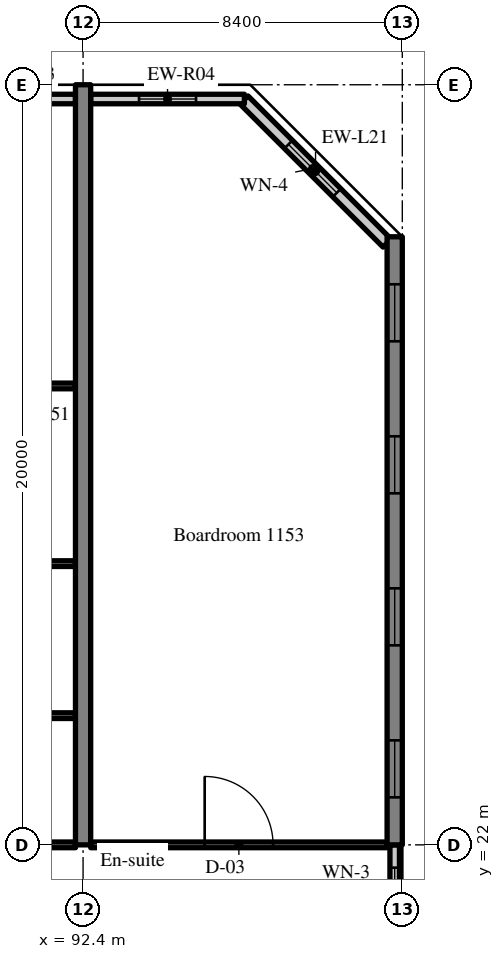
"""IFC4 building model, lengths in metres.
Left out: names, types, materials, properties, quantities, classifications, styles, units other than length and angle.
Written with IfcOpenShell. Run it as: python <this file> out.ifc"""

import sys

from ifc_helpers import new_model, si_unit, direction, frame, frame_2d, origin, place, context, subcontext, project, spatial, rectangle, extrude, source, transform, mapped, element, fill, save


model = new_model("IFC4")
c1 = context("Model", 3, precision=1e-05, world=origin(), true_north=direction((0.0, 1.0)))
c2 = subcontext(c1, "Body", "Model", "MODEL_VIEW")
j1 = project(units=[si_unit("LENGTHUNIT", "METRE"), si_unit("PLANEANGLEUNIT", "RADIAN")], contexts=[c1])
p1 = place(None, origin())
s1 = spatial("IfcSite", under=j1, at=p1, CompositionType="ELEMENT")
p2 = place(p1, origin())
s2 = spatial("IfcBuilding", under=s1, at=p2, CompositionType="ELEMENT")
p3 = place(p2, frame((0.0, 0.0, 50.6)))
s3 = spatial("IfcBuildingStorey", under=s2, at=p3, CompositionType="ELEMENT", Elevation=50.6)
m1 = source(origin(), c2, "Body", "SweptSolid", [
    extrude(rectangle(XDim=20.0, YDim=0.4, at=frame_2d((10.0, 0.0))), origin(), (0.0, 0.0, 1.0), 3.52),
])
p4 = place(p3, frame((92.4, 22.0, 0.0), z_axis=(0.0, 0.0, 1.0), x_axis=(0.0, 1.0, 0.0)))
e1 = element("IfcWall", 1, at=p4, inside=s3, PredefinedType="SHEAR", context=c2, shape_type="MappedRepresentation", body=[
    mapped(m1, transform((0.0, 0.0, 0.0), scale=1.0)),
])
m2 = source(origin(), c2, "Body", "SweptSolid", [
    extrude(rectangle(XDim=16.0, YDim=0.4, at=frame_2d((8.0, 0.0))), origin(), (0.0, 0.0, 1.0), 3.52),
])
p5 = place(p3, frame((100.6, 22.0, 0.0), z_axis=(0.0, 0.0, 1.0), x_axis=(0.0, 1.0, 0.0)))
e2 = element("IfcWall", 2, at=p5, inside=s3, PredefinedType="SHEAR", context=c2, shape_type="MappedRepresentation", body=[
    mapped(m2, transform((0.0, 0.0, 0.0), scale=1.0)),
])
m3 = source(origin(), c2, "Body", "SweptSolid", [
    extrude(rectangle(XDim=1.5, YDim=1.5, at=frame_2d((0.75, 0.75))), frame((0.0, 0.21, 0.0), z_axis=(0.0, -1.0, 0.0), x_axis=(1.0, 0.0, 0.0)), (0.0, 0.0, 1.0), 0.42),
])
p6 = place(p5, frame((1.25, 0.0, 0.9)))
e3 = element("IfcOpeningElement", 3, at=p6, cuts=e2, PredefinedType="OPENING", context=c2, shape_type="MappedRepresentation", body=[
    mapped(m3, transform((0.0, 0.0, 0.0), scale=1.0)),
])
p7 = place(p5, frame((5.25, 0.0, 0.9)))
e4 = element("IfcOpeningElement", 4, at=p7, cuts=e2, PredefinedType="OPENING", context=c2, shape_type="MappedRepresentation", body=[
    mapped(m3, transform((0.0, 0.0, 0.0), scale=1.0)),
])
p8 = place(p5, frame((9.25, 0.0, 0.9)))
e5 = element("IfcOpeningElement", 5, at=p8, cuts=e2, PredefinedType="OPENING", context=c2, shape_type="MappedRepresentation", body=[
    mapped(m3, transform((0.0, 0.0, 0.0), scale=1.0)),
])
p9 = place(p5, frame((13.25, 0.0, 0.9)))
e6 = element("IfcOpeningElement", 6, at=p9, cuts=e2, PredefinedType="OPENING", context=c2, shape_type="MappedRepresentation", body=[
    mapped(m3, transform((0.0, 0.0, 0.0), scale=1.0)),
])
m4 = source(origin(), c2, "Body", "SweptSolid", [
    extrude(rectangle(XDim=5.326, YDim=0.3, at=frame_2d((2.663, 0.0))), origin(), (0.0, 0.0, 1.0), 3.52),
])
p10 = place(p3, frame((100.4, 37.834, 0.0), z_axis=(0.0, 0.0, 1.0), x_axis=(-0.707083859269, 0.707129702361, 0.0)))
e7 = element("IfcWall", 7, at=p10, inside=s3, PredefinedType="SOLIDWALL", context=c2, shape_type="MappedRepresentation", body=[
    mapped(m4, transform((0.0, 0.0, 0.0), scale=1.0)),
])
m5 = source(origin(), c2, "Body", "SweptSolid", [
    extrude(rectangle(XDim=1.8, YDim=1.5, at=frame_2d((0.9, 0.75))), frame((0.0, 0.16, 0.0), z_axis=(0.0, -1.0, 0.0), x_axis=(1.0, 0.0, 0.0)), (0.0, 0.0, 1.0), 0.32),
])
p11 = place(p10, frame((1.871, 0.0, 0.9)))
e8 = element("IfcOpeningElement", 8, at=p11, cuts=e7, PredefinedType="OPENING", context=c2, shape_type="MappedRepresentation", body=[
    mapped(m5, transform((0.0, 0.0, 0.0), scale=1.0)),
])
m6 = source(origin(), c2, "Body", "SweptSolid", [
    extrude(rectangle(XDim=3.6, YDim=0.25, at=frame_2d((1.8, 0.0))), origin(), (0.0, 0.0, 1.0), 2.82),
])
p12 = place(p3, frame((92.2, 41.625, 0.0), z_axis=(0.0, 0.0, 1.0), x_axis=(-1.0, 0.0, 0.0)))
e9 = element("IfcWall", 9, at=p12, inside=s3, PredefinedType="SOLIDWALL", context=c2, shape_type="MappedRepresentation", body=[
    mapped(m6, transform((0.0, 0.0, 0.0), scale=1.0)),
])
m7 = source(origin(), c2, "Body", "SweptSolid", [
    extrude(rectangle(XDim=1.5, YDim=1.5, at=frame_2d((0.75, 0.75))), frame((0.0, 0.135, 0.0), z_axis=(0.0, -1.0, 0.0), x_axis=(1.0, 0.0, 0.0)), (0.0, 0.0, 1.0), 0.27),
])
p13 = place(p12, frame((1.05, 0.0, 0.9)))
e10 = element("IfcOpeningElement", 10, at=p13, cuts=e9, PredefinedType="OPENING", context=c2, shape_type="MappedRepresentation", body=[
    mapped(m7, transform((0.0, 0.0, 0.0), scale=1.0)),
])
m8 = source(origin(), c2, "Body", "SweptSolid", [
    extrude(rectangle(XDim=4.045, YDim=0.25, at=frame_2d((2.022, 0.0))), origin(), (0.0, 0.0, 1.0), 2.82),
])
p14 = place(p3, frame((96.645, 41.625, 0.0), z_axis=(0.0, 0.0, 1.0), x_axis=(-1.0, 0.0, 0.0)))
e11 = element("IfcWall", 11, at=p14, inside=s3, PredefinedType="SOLIDWALL", context=c2, shape_type="MappedRepresentation", body=[
    mapped(m8, transform((0.0, 0.0, 0.0), scale=1.0)),
])
p15 = place(p14, frame((1.272, 0.0, 0.9)))
e12 = element("IfcOpeningElement", 12, at=p15, cuts=e11, PredefinedType="OPENING", context=c2, shape_type="MappedRepresentation", body=[
    mapped(m7, transform((0.0, 0.0, 0.0), scale=1.0)),
])
m9 = source(origin(), c2, "Body", "SweptSolid", [
    extrude(rectangle(XDim=2.4, YDim=0.25, at=frame_2d((1.2, 0.0))), origin(), (0.0, 0.0, 1.0), 2.62),
])
p16 = place(p3, frame((100.6, 19.6, 0.0), z_axis=(0.0, 0.0, 1.0), x_axis=(0.0, 1.0, 0.0)))
e13 = element("IfcWall", 13, at=p16, inside=s3, PredefinedType="SOLIDWALL", context=c2, shape_type="MappedRepresentation", body=[
    mapped(m9, transform((0.0, 0.0, 0.0), scale=1.0)),
])
m10 = source(origin(), c2, "Body", "SweptSolid", [
    extrude(rectangle(XDim=1.2, YDim=1.5, at=frame_2d((0.6, 0.75))), frame((0.0, 0.135, 0.0), z_axis=(0.0, -1.0, 0.0), x_axis=(1.0, 0.0, 0.0)), (0.0, 0.0, 1.0), 0.27),
])
p17 = place(p16, frame((0.6, 0.0, 0.9)))
e14 = element("IfcOpeningElement", 14, at=p17, cuts=e13, PredefinedType="OPENING", context=c2, shape_type="MappedRepresentation", body=[
    mapped(m10, transform((0.0, 0.0, 0.0), scale=1.0)),
])
m11 = source(origin(), c2, "Body", "SweptSolid", [
    extrude(rectangle(XDim=5.45, YDim=0.15, at=frame_2d((2.725, 0.0))), origin(), (0.0, 0.0, 1.0), 2.82),
])
p18 = place(p3, frame((86.75, 22.0, 0.0), z_axis=(0.0, 0.0, 1.0), x_axis=(1.0, 0.0, 0.0)))
e15 = element("IfcWall", 15, at=p18, inside=s3, PredefinedType="PARTITIONING", context=c2, shape_type="MappedRepresentation", body=[
    mapped(m11, transform((0.0, 0.0, 0.0), scale=1.0)),
])
m12 = source(origin(), c2, "Body", "SweptSolid", [
    extrude(rectangle(XDim=5.45, YDim=0.15, at=frame_2d((2.725, 0.0))), origin(), (0.0, 0.0, 1.0), 3.52),
])
for number, where, z_axis, x_axis in (
    (16, (86.75, 25.4, 0.0), (0.0, 0.0, 1.0), (1.0, 0.0, 0.0)),
    (17, (86.75, 29.4, 0.0), (0.0, 0.0, 1.0), (1.0, 0.0, 0.0)),
):
    element("IfcWall", number, at=place(p3, frame(where, z_axis=z_axis, x_axis=x_axis)), inside=s3, PredefinedType="PARTITIONING", context=c2, shape_type="MappedRepresentation", body=[
        mapped(m12, transform((0.0, 0.0, 0.0), scale=1.0)),
    ])
m13 = source(origin(), c2, "Body", "SweptSolid", [
    extrude(rectangle(XDim=8.0, YDim=0.15, at=frame_2d((4.0, 0.0))), origin(), (0.0, 0.0, 1.0), 3.52),
])
p19 = place(p3, frame((84.2, 34.075, 0.0), z_axis=(0.0, 0.0, 1.0), x_axis=(1.0, 0.0, 0.0)))
e18 = element("IfcWall", 18, at=p19, inside=s3, PredefinedType="PARTITIONING", context=c2, shape_type="MappedRepresentation", body=[
    mapped(m13, transform((0.0, 0.0, 0.0), scale=1.0)),
])
m14 = source(origin(), c2, "Body", "SweptSolid", [
    extrude(rectangle(XDim=1.0, YDim=2.1, at=frame_2d((0.5, 1.05))), frame((0.0, 0.085, 0.0), z_axis=(0.0, -1.0, 0.0), x_axis=(1.0, 0.0, 0.0)), (0.0, 0.0, 1.0), 0.17),
])
p20 = place(p19, frame((0.7, 0.0, 0.0)))
e19 = element("IfcOpeningElement", 19, at=p20, cuts=e18, PredefinedType="OPENING", context=c2, shape_type="MappedRepresentation", body=[
    mapped(m14, transform((0.0, 0.0, 0.0), scale=1.0)),
])
m15 = source(origin(), c2, "Body", "SweptSolid", [
    extrude(rectangle(XDim=7.8, YDim=0.15, at=frame_2d((3.9, 0.0))), origin(), (0.0, 0.0, 1.0), 2.82),
])
p21 = place(p3, frame((92.6, 22.0, 0.0), z_axis=(0.0, 0.0, 1.0), x_axis=(1.0, 0.0, 0.0)))
e20 = element("IfcWall", 20, at=p21, inside=s3, PredefinedType="PARTITIONING", context=c2, shape_type="MappedRepresentation", body=[
    mapped(m15, transform((0.0, 0.0, 0.0), scale=1.0)),
])
m16 = source(origin(), c2, "Body", "SweptSolid", [
    extrude(rectangle(XDim=1.8, YDim=2.1, at=frame_2d((0.9, 1.05))), frame((0.0, 0.085, 0.0), z_axis=(0.0, -1.0, 0.0), x_axis=(1.0, 0.0, 0.0)), (0.0, 0.0, 1.0), 0.17),
])
p22 = place(p21, frame((3.0, 0.0, 0.0)))
e21 = element("IfcOpeningElement", 21, at=p22, cuts=e20, PredefinedType="OPENING", context=c2, shape_type="MappedRepresentation", body=[
    mapped(m16, transform((0.0, 0.0, 0.0), scale=1.0)),
])
m17 = source(origin(), c2, "Body", "SweptSolid", [
    extrude(rectangle(XDim=1.8, YDim=1.5, at=frame_2d((0.9, 0.75))), frame((0.0, 0.03, 0.0), z_axis=(0.0, -1.0, 0.0), x_axis=(1.0, 0.0, 0.0)), (0.0, 0.0, 1.0), 0.06),
])
p23 = place(p11, origin())
e22 = element("IfcWindow", 22, at=p23, inside=s3, PartitioningType="SINGLE_PANEL", PredefinedType="WINDOW", context=c2, shape_type="MappedRepresentation", body=[
    mapped(m17, transform((0.0, 0.0, 0.0), scale=1.0)),
])
fill(e8, e22)
m18 = source(origin(), c2, "Body", "SweptSolid", [
    extrude(rectangle(XDim=1.5, YDim=1.5, at=frame_2d((0.75, 0.75))), frame((0.0, 0.03, 0.0), z_axis=(0.0, -1.0, 0.0), x_axis=(1.0, 0.0, 0.0)), (0.0, 0.0, 1.0), 0.06),
])
p24 = place(p15, origin())
e23 = element("IfcWindow", 23, at=p24, inside=s3, PartitioningType="SINGLE_PANEL", PredefinedType="WINDOW", context=c2, shape_type="MappedRepresentation", body=[
    mapped(m18, transform((0.0, 0.0, 0.0), scale=1.0)),
])
fill(e12, e23)
p25 = place(p6, origin())
e24 = element("IfcWindow", 24, at=p25, inside=s3, PartitioningType="SINGLE_PANEL", PredefinedType="WINDOW", context=c2, shape_type="MappedRepresentation", body=[
    mapped(m18, transform((0.0, 0.0, 0.0), scale=1.0)),
])
fill(e3, e24)
p26 = place(p7, origin())
e25 = element("IfcWindow", 25, at=p26, inside=s3, PartitioningType="SINGLE_PANEL", PredefinedType="WINDOW", context=c2, shape_type="MappedRepresentation", body=[
    mapped(m18, transform((0.0, 0.0, 0.0), scale=1.0)),
])
fill(e4, e25)
p27 = place(p8, origin())
e26 = element("IfcWindow", 26, at=p27, inside=s3, PartitioningType="SINGLE_PANEL", PredefinedType="WINDOW", context=c2, shape_type="MappedRepresentation", body=[
    mapped(m18, transform((0.0, 0.0, 0.0), scale=1.0)),
])
fill(e5, e26)
p28 = place(p9, origin())
e27 = element("IfcWindow", 27, at=p28, inside=s3, PartitioningType="SINGLE_PANEL", PredefinedType="WINDOW", context=c2, shape_type="MappedRepresentation", body=[
    mapped(m18, transform((0.0, 0.0, 0.0), scale=1.0)),
])
fill(e6, e27)
m19 = source(origin(), c2, "Body", "SweptSolid", [
    extrude(rectangle(XDim=1.2, YDim=1.5, at=frame_2d((0.6, 0.75))), frame((0.0, 0.03, 0.0), z_axis=(0.0, -1.0, 0.0), x_axis=(1.0, 0.0, 0.0)), (0.0, 0.0, 1.0), 0.06),
])
p29 = place(p17, origin())
e28 = element("IfcWindow", 28, at=p29, inside=s3, PartitioningType="SINGLE_PANEL", PredefinedType="WINDOW", context=c2, shape_type="MappedRepresentation", body=[
    mapped(m19, transform((0.0, 0.0, 0.0), scale=1.0)),
])
fill(e14, e28)
m20 = source(origin(), c2, "Body", "SweptSolid", [
    extrude(rectangle(XDim=1.8, YDim=2.1, at=frame_2d((0.9, 1.05))), frame((0.0, 0.025, 0.0), z_axis=(0.0, -1.0, 0.0), x_axis=(1.0, 0.0, 0.0)), (0.0, 0.0, 1.0), 0.05),
])
p30 = place(p22, origin())
e29 = element("IfcDoor", 29, at=p30, inside=s3, OperationType="DOUBLE_DOOR_SINGLE_SWING", PredefinedType="DOOR", context=c2, shape_type="MappedRepresentation", body=[
    mapped(m20, transform((0.0, 0.0, 0.0), scale=1.0)),
])
fill(e21, e29)
save(model, sys.argv[1])
